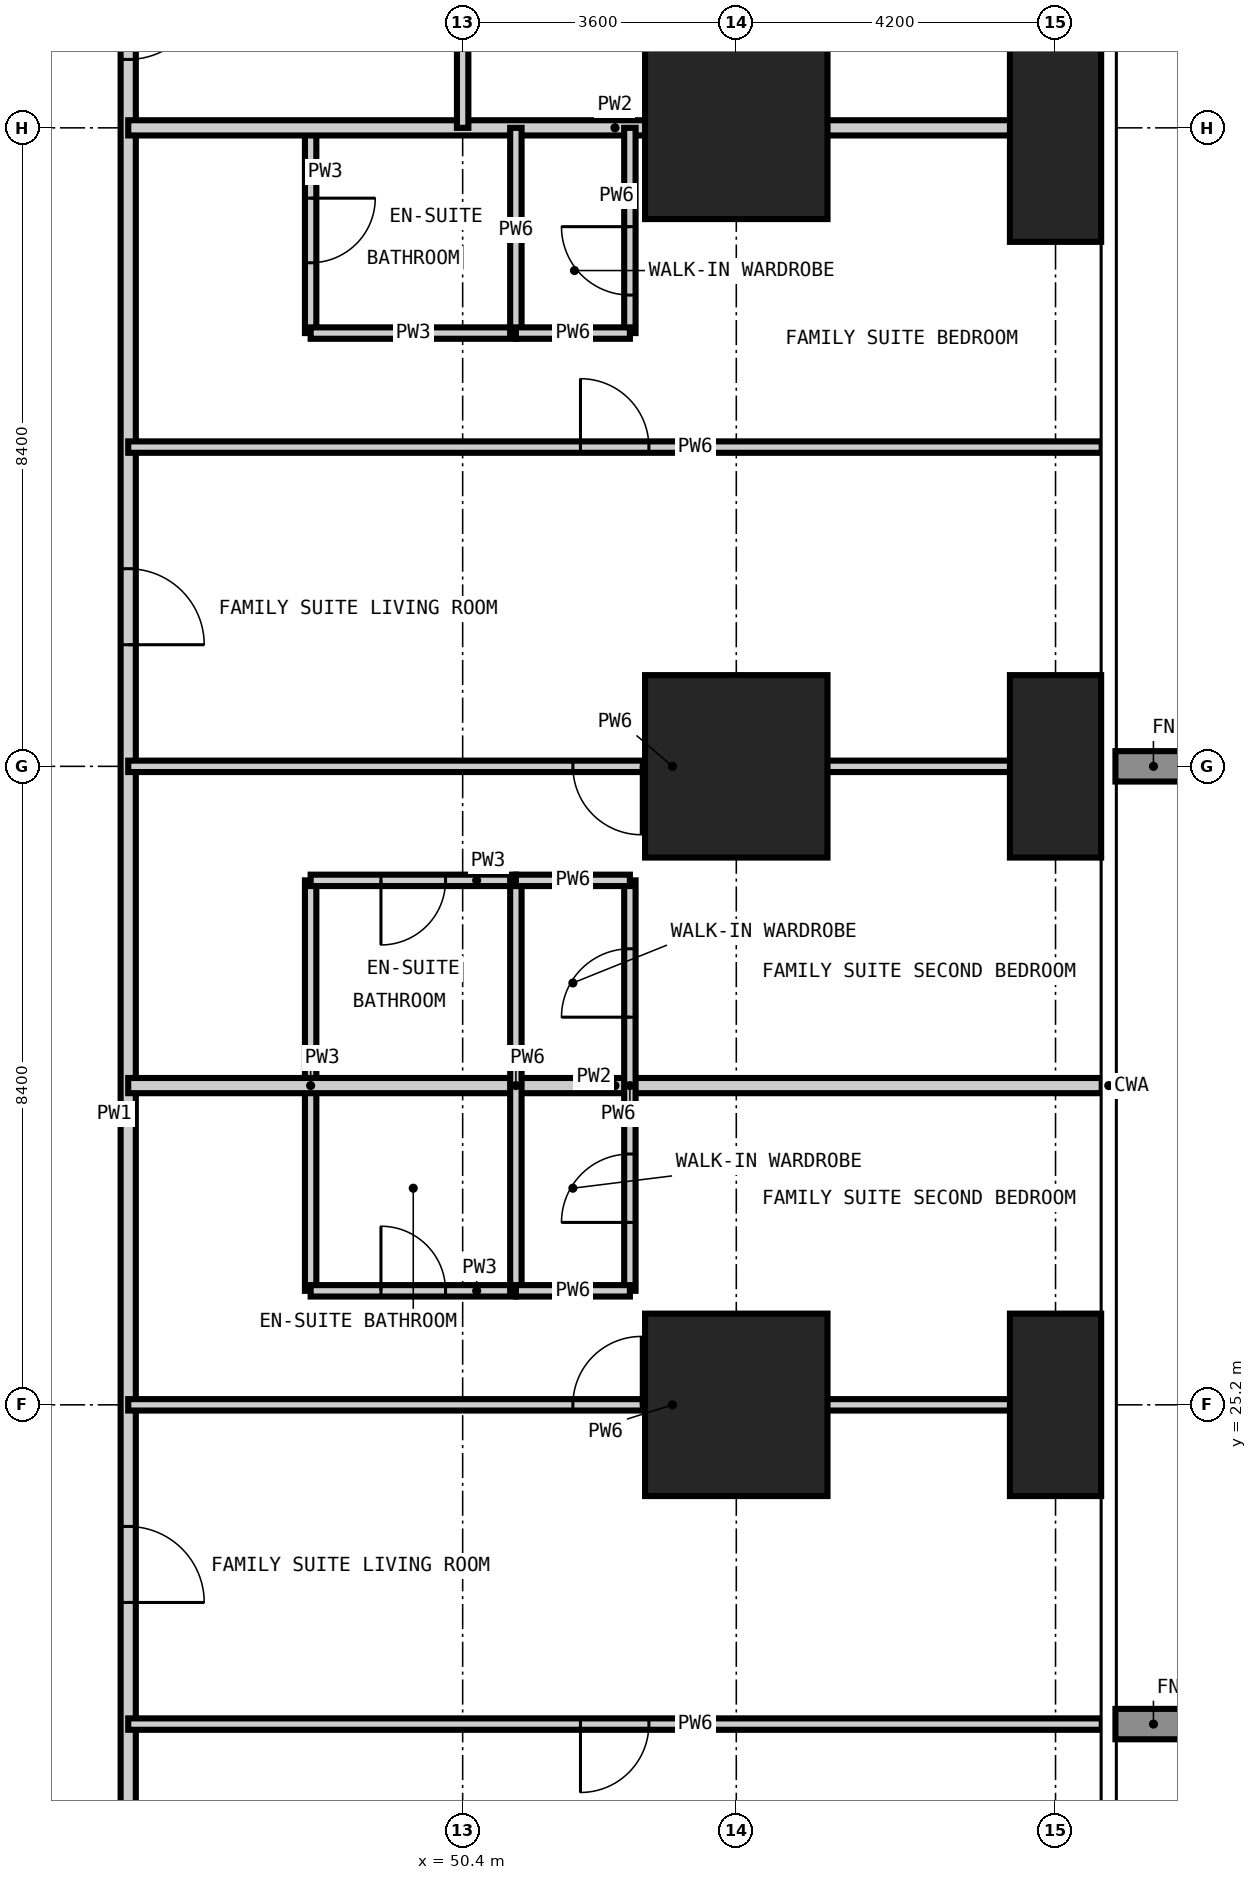
"""IFC4 building model, lengths in metres.
Left out: names, types, materials, properties, quantities, classifications, styles, units other than length and angle.
Written with IfcOpenShell. Run it as: python <this file> out.ifc"""

import sys

from ifc_helpers import new_model, si_unit, direction, frame, frame_2d, origin, origin_2d, place, context, subcontext, project, spatial, rectangle, extrude, element, fill, save


model = new_model("IFC4")
c1 = context("Model", 3, precision=1e-05, world=origin(), true_north=direction((0.0, 1.0)))
c2 = subcontext(c1, "Body", "Model", "MODEL_VIEW")
j1 = project(units=[si_unit("LENGTHUNIT", "METRE"), si_unit("PLANEANGLEUNIT", "RADIAN")], contexts=[c1])
p1 = place(None, origin())
s1 = spatial("IfcSite", under=j1, at=p1, CompositionType="ELEMENT")
p2 = place(p1, origin())
s2 = spatial("IfcBuilding", under=s1, at=p2, CompositionType="ELEMENT")
p3 = place(p2, frame((0.0, 0.0, 84.6)))
s3 = spatial("IfcBuildingStorey", under=s2, at=p3, CompositionType="ELEMENT", Elevation=84.6)
for number, where, z_axis, x_axis in (
    (1, (54.0, 25.2, -0.35), (0.0, 0.0, 1.0), (1.0, 0.0, 0.0)),
    (2, (54.0, 33.6, -0.35), (0.0, 0.0, 1.0), (1.0, 0.0, 0.0)),
    (3, (54.0, 42.0, -0.35), (0.0, 0.0, 1.0), (1.0, 0.0, 0.0)),
):
    element("IfcColumn", number, at=place(p3, frame(where, z_axis=z_axis, x_axis=x_axis)), inside=s3, PredefinedType="COLUMN", context=c2, shape_type="SweptSolid", body=[
        extrude(rectangle(XDim=2.4, YDim=2.4, at=origin_2d()), origin(), (0.0, 0.0, 1.0), 3.55),
    ])
for number, where, z_axis, x_axis in (
    (4, (58.2, 25.2, -0.35), (0.0, 0.0, 1.0), (1.0, 0.0, 0.0)),
    (5, (58.2, 33.6, -0.35), (0.0, 0.0, 1.0), (1.0, 0.0, 0.0)),
):
    element("IfcColumn", number, at=place(p3, frame(where, z_axis=z_axis, x_axis=x_axis)), inside=s3, PredefinedType="COLUMN", context=c2, shape_type="SweptSolid", body=[
        extrude(rectangle(XDim=1.2, YDim=2.4, at=origin_2d()), origin(), (0.0, 0.0, 1.0), 3.55),
    ])
p4 = place(p3, frame((58.2, 42.0, -0.35), z_axis=(0.0, 0.0, 1.0), x_axis=(1.0, 0.0, 0.0)))
e6 = element("IfcColumn", 6, at=p4, inside=s3, PredefinedType="COLUMN", context=c2, shape_type="SweptSolid", body=[
    extrude(rectangle(XDim=1.2, YDim=3.0, at=origin_2d()), origin(), (0.0, 0.0, 1.0), 3.55),
])
p5 = place(p3, frame((48.4, 26.7, 0.0), z_axis=(0.0, 0.0, 1.0), x_axis=(0.0, 1.0, 0.0)))
e7 = element("IfcWall", 7, at=p5, inside=s3, PredefinedType="PARTITIONING", context=c2, shape_type="SweptSolid", body=[
    extrude(rectangle(XDim=5.4, YDim=0.15, at=frame_2d((2.7, 0.0))), origin(), (0.0, 0.0, 1.0), 3.2),
])
p6 = place(p3, frame((48.4, 39.3, 0.0), z_axis=(0.0, 0.0, 1.0), x_axis=(0.0, 1.0, 0.0)))
e8 = element("IfcWall", 8, at=p6, inside=s3, PredefinedType="PARTITIONING", context=c2, shape_type="SweptSolid", body=[
    extrude(rectangle(XDim=2.7, YDim=0.15, at=frame_2d((1.35, 0.0))), origin(), (0.0, 0.0, 1.0), 3.2),
])
p7 = place(p6, frame((0.925, 0.0, 0.0)))
e9 = element("IfcOpeningElement", 9, at=p7, cuts=e8, PredefinedType="OPENING", context=c2, shape_type="SweptSolid", body=[
    extrude(rectangle(XDim=0.85, YDim=2.1, at=frame_2d((0.425, 1.05))), frame((0.0, 0.085, 0.0), z_axis=(0.0, -1.0, 0.0), x_axis=(1.0, 0.0, 0.0)), (0.0, 0.0, 1.0), 0.17),
])
p8 = place(p3, frame((48.4, 26.7, 0.0), z_axis=(0.0, 0.0, 1.0), x_axis=(1.0, 0.0, 0.0)))
e10 = element("IfcWall", 10, at=p8, inside=s3, PredefinedType="PARTITIONING", context=c2, shape_type="SweptSolid", body=[
    extrude(rectangle(XDim=2.7, YDim=0.15, at=frame_2d((1.35, 0.0))), origin(), (0.0, 0.0, 1.0), 3.2),
])
p9 = place(p8, frame((0.925, 0.0, 0.0)))
e11 = element("IfcOpeningElement", 11, at=p9, cuts=e10, PredefinedType="OPENING", context=c2, shape_type="SweptSolid", body=[
    extrude(rectangle(XDim=0.85, YDim=2.1, at=frame_2d((0.425, 1.05))), frame((0.0, 0.085, 0.0), z_axis=(0.0, -1.0, 0.0), x_axis=(1.0, 0.0, 0.0)), (0.0, 0.0, 1.0), 0.17),
])
p10 = place(p3, frame((48.4, 32.1, 0.0), z_axis=(0.0, 0.0, 1.0), x_axis=(1.0, 0.0, 0.0)))
e12 = element("IfcWall", 12, at=p10, inside=s3, PredefinedType="PARTITIONING", context=c2, shape_type="SweptSolid", body=[
    extrude(rectangle(XDim=2.7, YDim=0.15, at=frame_2d((1.35, 0.0))), origin(), (0.0, 0.0, 1.0), 3.2),
])
p11 = place(p10, frame((0.925, 0.0, 0.0)))
e13 = element("IfcOpeningElement", 13, at=p11, cuts=e12, PredefinedType="OPENING", context=c2, shape_type="SweptSolid", body=[
    extrude(rectangle(XDim=0.85, YDim=2.1, at=frame_2d((0.425, 1.05))), frame((0.0, 0.085, 0.0), z_axis=(0.0, -1.0, 0.0), x_axis=(1.0, 0.0, 0.0)), (0.0, 0.0, 1.0), 0.17),
])
p12 = place(p3, frame((48.4, 39.3, 0.0), z_axis=(0.0, 0.0, 1.0), x_axis=(1.0, 0.0, 0.0)))
e14 = element("IfcWall", 14, at=p12, inside=s3, PredefinedType="PARTITIONING", context=c2, shape_type="SweptSolid", body=[
    extrude(rectangle(XDim=2.7, YDim=0.15, at=frame_2d((1.35, 0.0))), origin(), (0.0, 0.0, 1.0), 3.2),
])
p13 = place(p3, frame((46.0, 44.8, 0.0), z_axis=(0.0, 0.0, 1.0), x_axis=(0.0, -1.0, 0.0)))
e15 = element("IfcWall", 15, at=p13, inside=s3, PredefinedType="PARTITIONING", context=c2, shape_type="SweptSolid", body=[
    extrude(rectangle(XDim=31.4, YDim=0.2, at=frame_2d((15.7, 0.0))), origin(), (0.0, 0.0, 1.0), 3.2),
])
p14 = place(p13, frame((21.2, 0.0, 0.0)))
e16 = element("IfcOpeningElement", 16, at=p14, cuts=e15, PredefinedType="OPENING", context=c2, shape_type="SweptSolid", body=[
    extrude(rectangle(XDim=1.0, YDim=2.2, at=frame_2d((0.5, 1.1))), frame((0.0, 0.11, 0.0), z_axis=(0.0, -1.0, 0.0), x_axis=(1.0, 0.0, 0.0)), (0.0, 0.0, 1.0), 0.22),
])
p15 = place(p13, frame((8.6, 0.0, 0.0)))
e17 = element("IfcOpeningElement", 17, at=p15, cuts=e15, PredefinedType="OPENING", context=c2, shape_type="SweptSolid", body=[
    extrude(rectangle(XDim=1.0, YDim=2.2, at=frame_2d((0.5, 1.1))), frame((0.0, 0.11, 0.0), z_axis=(0.0, -1.0, 0.0), x_axis=(1.0, 0.0, 0.0)), (0.0, 0.0, 1.0), 0.22),
])
p16 = place(p13, frame((29.2, 0.0, 0.0)))
e18 = element("IfcOpeningElement", 18, at=p16, cuts=e15, PredefinedType="OPENING", context=c2, shape_type="SweptSolid", body=[
    extrude(rectangle(XDim=1.0, YDim=2.2, at=frame_2d((0.5, 1.1))), frame((0.0, 0.11, 0.0), z_axis=(0.0, -1.0, 0.0), x_axis=(1.0, 0.0, 0.0)), (0.0, 0.0, 1.0), 0.22),
])
p17 = place(p13, frame((0.9, 0.0, 0.0)))
e19 = element("IfcOpeningElement", 19, at=p17, cuts=e15, PredefinedType="OPENING", context=c2, shape_type="SweptSolid", body=[
    extrude(rectangle(XDim=1.0, YDim=2.2, at=frame_2d((0.5, 1.1))), frame((0.0, 0.11, 0.0), z_axis=(0.0, -1.0, 0.0), x_axis=(1.0, 0.0, 0.0)), (0.0, 0.0, 1.0), 0.22),
])
for number, where, z_axis, x_axis in (
    (20, (46.0, 29.4, 0.0), (0.0, 0.0, 1.0), (1.0, 0.0, 0.0)),
    (21, (46.0, 42.0, 0.0), (0.0, 0.0, 1.0), (1.0, 0.0, 0.0)),
):
    element("IfcWall", number, at=place(p3, frame(where, z_axis=z_axis, x_axis=x_axis)), inside=s3, PredefinedType="PARTITIONING", context=c2, shape_type="SweptSolid", body=[
        extrude(rectangle(XDim=12.808, YDim=0.2, at=frame_2d((6.404, 0.0))), origin(), (0.0, 0.0, 1.0), 3.2),
    ])
p18 = place(p3, frame((50.4, 42.0, 0.0), z_axis=(0.0, 0.0, 1.0), x_axis=(0.0, 1.0, 0.0)))
e22 = element("IfcWall", 22, at=p18, inside=s3, PredefinedType="PARTITIONING", context=c2, shape_type="SweptSolid", body=[
    extrude(rectangle(XDim=16.808, YDim=0.15, at=frame_2d((8.404, 0.0))), origin(), (0.0, 0.0, 1.0), 3.2),
])
p19 = place(p18, frame((13.95, 0.0, 0.0)))
e23 = element("IfcOpeningElement", 23, at=p19, cuts=e22, PredefinedType="OPENING", context=c2, shape_type="SweptSolid", body=[
    extrude(rectangle(XDim=0.9, YDim=2.1, at=frame_2d((0.45, 1.05))), frame((0.0, 0.085, 0.0), z_axis=(0.0, -1.0, 0.0), x_axis=(1.0, 0.0, 0.0)), (0.0, 0.0, 1.0), 0.17),
])
p20 = place(p18, frame((3.75, 0.0, 0.0)))
e24 = element("IfcOpeningElement", 24, at=p20, cuts=e22, PredefinedType="OPENING", context=c2, shape_type="SweptSolid", body=[
    extrude(rectangle(XDim=0.9, YDim=2.1, at=frame_2d((0.45, 1.05))), frame((0.0, 0.085, 0.0), z_axis=(0.0, -1.0, 0.0), x_axis=(1.0, 0.0, 0.0)), (0.0, 0.0, 1.0), 0.17),
])
p21 = place(p3, frame((51.1, 26.7, 0.0), z_axis=(0.0, 0.0, 1.0), x_axis=(0.0, 1.0, 0.0)))
e25 = element("IfcWall", 25, at=p21, inside=s3, PredefinedType="PARTITIONING", context=c2, shape_type="SweptSolid", body=[
    extrude(rectangle(XDim=5.4, YDim=0.15, at=frame_2d((2.7, 0.0))), origin(), (0.0, 0.0, 1.0), 3.2),
])
p22 = place(p3, frame((51.1, 39.3, 0.0), z_axis=(0.0, 0.0, 1.0), x_axis=(0.0, 1.0, 0.0)))
e26 = element("IfcWall", 26, at=p22, inside=s3, PredefinedType="PARTITIONING", context=c2, shape_type="SweptSolid", body=[
    extrude(rectangle(XDim=2.7, YDim=0.15, at=frame_2d((1.35, 0.0))), origin(), (0.0, 0.0, 1.0), 3.2),
])
p23 = place(p3, frame((52.6, 26.7, 0.0), z_axis=(0.0, 0.0, 1.0), x_axis=(0.0, 1.0, 0.0)))
e27 = element("IfcWall", 27, at=p23, inside=s3, PredefinedType="PARTITIONING", context=c2, shape_type="SweptSolid", body=[
    extrude(rectangle(XDim=5.4, YDim=0.15, at=frame_2d((2.7, 0.0))), origin(), (0.0, 0.0, 1.0), 3.2),
])
p24 = place(p23, frame((0.9, 0.0, 0.0)))
e28 = element("IfcOpeningElement", 28, at=p24, cuts=e27, PredefinedType="OPENING", context=c2, shape_type="SweptSolid", body=[
    extrude(rectangle(XDim=0.9, YDim=2.1, at=frame_2d((0.45, 1.05))), frame((0.0, 0.085, 0.0), z_axis=(0.0, -1.0, 0.0), x_axis=(1.0, 0.0, 0.0)), (0.0, 0.0, 1.0), 0.17),
])
p25 = place(p23, frame((3.6, 0.0, 0.0)))
e29 = element("IfcOpeningElement", 29, at=p25, cuts=e27, PredefinedType="OPENING", context=c2, shape_type="SweptSolid", body=[
    extrude(rectangle(XDim=0.9, YDim=2.1, at=frame_2d((0.45, 1.05))), frame((0.0, 0.085, 0.0), z_axis=(0.0, -1.0, 0.0), x_axis=(1.0, 0.0, 0.0)), (0.0, 0.0, 1.0), 0.17),
])
p26 = place(p3, frame((52.6, 39.3, 0.0), z_axis=(0.0, 0.0, 1.0), x_axis=(0.0, 1.0, 0.0)))
e30 = element("IfcWall", 30, at=p26, inside=s3, PredefinedType="PARTITIONING", context=c2, shape_type="SweptSolid", body=[
    extrude(rectangle(XDim=2.7, YDim=0.15, at=frame_2d((1.35, 0.0))), origin(), (0.0, 0.0, 1.0), 3.2),
])
p27 = place(p26, frame((0.5, 0.0, 0.0)))
e31 = element("IfcOpeningElement", 31, at=p27, cuts=e30, PredefinedType="OPENING", context=c2, shape_type="SweptSolid", body=[
    extrude(rectangle(XDim=0.9, YDim=2.1, at=frame_2d((0.45, 1.05))), frame((0.0, 0.085, 0.0), z_axis=(0.0, -1.0, 0.0), x_axis=(1.0, 0.0, 0.0)), (0.0, 0.0, 1.0), 0.17),
])
p28 = place(p3, frame((46.0, 21.0, 0.0), z_axis=(0.0, 0.0, 1.0), x_axis=(1.0, 0.0, 0.0)))
e32 = element("IfcWall", 32, at=p28, inside=s3, PredefinedType="PARTITIONING", context=c2, shape_type="SweptSolid", body=[
    extrude(rectangle(XDim=12.808, YDim=0.15, at=frame_2d((6.404, 0.0))), origin(), (0.0, 0.0, 1.0), 3.2),
])
p29 = place(p28, frame((5.95, 0.0, 0.0)))
e33 = element("IfcOpeningElement", 33, at=p29, cuts=e32, PredefinedType="OPENING", context=c2, shape_type="SweptSolid", body=[
    extrude(rectangle(XDim=0.9, YDim=2.1, at=frame_2d((0.45, 1.05))), frame((0.0, 0.085, 0.0), z_axis=(0.0, -1.0, 0.0), x_axis=(1.0, 0.0, 0.0)), (0.0, 0.0, 1.0), 0.17),
])
p30 = place(p3, frame((46.0, 25.2, 0.0), z_axis=(0.0, 0.0, 1.0), x_axis=(1.0, 0.0, 0.0)))
e34 = element("IfcWall", 34, at=p30, inside=s3, PredefinedType="PARTITIONING", context=c2, shape_type="SweptSolid", body=[
    extrude(rectangle(XDim=12.808, YDim=0.15, at=frame_2d((6.404, 0.0))), origin(), (0.0, 0.0, 1.0), 3.2),
])
p31 = place(p30, frame((5.85, 0.0, 0.0)))
e35 = element("IfcOpeningElement", 35, at=p31, cuts=e34, PredefinedType="OPENING", context=c2, shape_type="SweptSolid", body=[
    extrude(rectangle(XDim=0.9, YDim=2.1, at=frame_2d((0.45, 1.05))), frame((0.0, 0.085, 0.0), z_axis=(0.0, -1.0, 0.0), x_axis=(1.0, 0.0, 0.0)), (0.0, 0.0, 1.0), 0.17),
])
for number, where, z_axis, x_axis in (
    (36, (51.1, 26.7, 0.0), (0.0, 0.0, 1.0), (1.0, 0.0, 0.0)),
    (37, (51.1, 32.1, 0.0), (0.0, 0.0, 1.0), (1.0, 0.0, 0.0)),
):
    element("IfcWall", number, at=place(p3, frame(where, z_axis=z_axis, x_axis=x_axis)), inside=s3, PredefinedType="PARTITIONING", context=c2, shape_type="SweptSolid", body=[
        extrude(rectangle(XDim=1.5, YDim=0.15, at=frame_2d((0.75, 0.0))), origin(), (0.0, 0.0, 1.0), 3.2),
    ])
p32 = place(p3, frame((46.0, 33.6, 0.0), z_axis=(0.0, 0.0, 1.0), x_axis=(1.0, 0.0, 0.0)))
e38 = element("IfcWall", 38, at=p32, inside=s3, PredefinedType="PARTITIONING", context=c2, shape_type="SweptSolid", body=[
    extrude(rectangle(XDim=12.808, YDim=0.15, at=frame_2d((6.404, 0.0))), origin(), (0.0, 0.0, 1.0), 3.2),
])
p33 = place(p32, frame((5.85, 0.0, 0.0)))
e39 = element("IfcOpeningElement", 39, at=p33, cuts=e38, PredefinedType="OPENING", context=c2, shape_type="SweptSolid", body=[
    extrude(rectangle(XDim=0.9, YDim=2.1, at=frame_2d((0.45, 1.05))), frame((0.0, 0.085, 0.0), z_axis=(0.0, -1.0, 0.0), x_axis=(1.0, 0.0, 0.0)), (0.0, 0.0, 1.0), 0.17),
])
p34 = place(p3, frame((46.0, 37.8, 0.0), z_axis=(0.0, 0.0, 1.0), x_axis=(1.0, 0.0, 0.0)))
e40 = element("IfcWall", 40, at=p34, inside=s3, PredefinedType="PARTITIONING", context=c2, shape_type="SweptSolid", body=[
    extrude(rectangle(XDim=12.808, YDim=0.15, at=frame_2d((6.404, 0.0))), origin(), (0.0, 0.0, 1.0), 3.2),
])
p35 = place(p34, frame((5.95, 0.0, 0.0)))
e41 = element("IfcOpeningElement", 41, at=p35, cuts=e40, PredefinedType="OPENING", context=c2, shape_type="SweptSolid", body=[
    extrude(rectangle(XDim=0.9, YDim=2.1, at=frame_2d((0.45, 1.05))), frame((0.0, 0.085, 0.0), z_axis=(0.0, -1.0, 0.0), x_axis=(1.0, 0.0, 0.0)), (0.0, 0.0, 1.0), 0.17),
])
p36 = place(p3, frame((51.1, 39.3, 0.0), z_axis=(0.0, 0.0, 1.0), x_axis=(1.0, 0.0, 0.0)))
e42 = element("IfcWall", 42, at=p36, inside=s3, PredefinedType="PARTITIONING", context=c2, shape_type="SweptSolid", body=[
    extrude(rectangle(XDim=1.5, YDim=0.15, at=frame_2d((0.75, 0.0))), origin(), (0.0, 0.0, 1.0), 3.2),
])
p37 = place(p14, origin())
e43 = element("IfcDoor", 43, at=p37, inside=s3, OperationType="SINGLE_SWING_RIGHT", PredefinedType="DOOR", context=c2, shape_type="SweptSolid", body=[
    extrude(rectangle(XDim=1.0, YDim=2.2, at=frame_2d((0.5, 1.1))), frame((0.0, 0.025, 0.0), z_axis=(0.0, -1.0, 0.0), x_axis=(1.0, 0.0, 0.0)), (0.0, 0.0, 1.0), 0.05),
])
fill(e16, e43)
p38 = place(p29, frame((0.9, 0.0, 0.0), z_axis=(0.0, 0.0, 1.0), x_axis=(-1.0, 0.0, 0.0)))
e44 = element("IfcDoor", 44, at=p38, inside=s3, OperationType="SINGLE_SWING_RIGHT", PredefinedType="DOOR", context=c2, shape_type="SweptSolid", body=[
    extrude(rectangle(XDim=0.9, YDim=2.1, at=frame_2d((0.45, 1.05))), frame((0.0, 0.025, 0.0), z_axis=(0.0, -1.0, 0.0), x_axis=(1.0, 0.0, 0.0)), (0.0, 0.0, 1.0), 0.05),
])
fill(e33, e44)
p39 = place(p31, origin())
e45 = element("IfcDoor", 45, at=p39, inside=s3, OperationType="SINGLE_SWING_RIGHT", PredefinedType="DOOR", context=c2, shape_type="SweptSolid", body=[
    extrude(rectangle(XDim=0.9, YDim=2.1, at=frame_2d((0.45, 1.05))), frame((0.0, 0.025, 0.0), z_axis=(0.0, -1.0, 0.0), x_axis=(1.0, 0.0, 0.0)), (0.0, 0.0, 1.0), 0.05),
])
fill(e35, e45)
p40 = place(p9, origin())
e46 = element("IfcDoor", 46, at=p40, inside=s3, OperationType="SINGLE_SWING_LEFT", PredefinedType="DOOR", context=c2, shape_type="SweptSolid", body=[
    extrude(rectangle(XDim=0.85, YDim=2.1, at=frame_2d((0.425, 1.05))), frame((0.0, 0.025, 0.0), z_axis=(0.0, -1.0, 0.0), x_axis=(1.0, 0.0, 0.0)), (0.0, 0.0, 1.0), 0.05),
])
fill(e11, e46)
p41 = place(p24, origin())
e47 = element("IfcDoor", 47, at=p41, inside=s3, OperationType="SINGLE_SWING_LEFT", PredefinedType="DOOR", context=c2, shape_type="SweptSolid", body=[
    extrude(rectangle(XDim=0.9, YDim=2.1, at=frame_2d((0.45, 1.05))), frame((0.0, 0.025, 0.0), z_axis=(0.0, -1.0, 0.0), x_axis=(1.0, 0.0, 0.0)), (0.0, 0.0, 1.0), 0.05),
])
fill(e28, e47)
p42 = place(p15, origin())
e48 = element("IfcDoor", 48, at=p42, inside=s3, OperationType="SINGLE_SWING_RIGHT", PredefinedType="DOOR", context=c2, shape_type="SweptSolid", body=[
    extrude(rectangle(XDim=1.0, YDim=2.2, at=frame_2d((0.5, 1.1))), frame((0.0, 0.025, 0.0), z_axis=(0.0, -1.0, 0.0), x_axis=(1.0, 0.0, 0.0)), (0.0, 0.0, 1.0), 0.05),
])
fill(e17, e48)
p43 = place(p35, origin())
e49 = element("IfcDoor", 49, at=p43, inside=s3, OperationType="SINGLE_SWING_LEFT", PredefinedType="DOOR", context=c2, shape_type="SweptSolid", body=[
    extrude(rectangle(XDim=0.9, YDim=2.1, at=frame_2d((0.45, 1.05))), frame((0.0, 0.025, 0.0), z_axis=(0.0, -1.0, 0.0), x_axis=(1.0, 0.0, 0.0)), (0.0, 0.0, 1.0), 0.05),
])
fill(e41, e49)
p44 = place(p7, frame((0.85, 0.0, 0.0), z_axis=(0.0, 0.0, 1.0), x_axis=(-1.0, 0.0, 0.0)))
e50 = element("IfcDoor", 50, at=p44, inside=s3, OperationType="SINGLE_SWING_LEFT", PredefinedType="DOOR", context=c2, shape_type="SweptSolid", body=[
    extrude(rectangle(XDim=0.85, YDim=2.1, at=frame_2d((0.425, 1.05))), frame((0.0, 0.025, 0.0), z_axis=(0.0, -1.0, 0.0), x_axis=(1.0, 0.0, 0.0)), (0.0, 0.0, 1.0), 0.05),
])
fill(e9, e50)
p45 = place(p27, origin())
e51 = element("IfcDoor", 51, at=p45, inside=s3, OperationType="SINGLE_SWING_RIGHT", PredefinedType="DOOR", context=c2, shape_type="SweptSolid", body=[
    extrude(rectangle(XDim=0.9, YDim=2.1, at=frame_2d((0.45, 1.05))), frame((0.0, 0.025, 0.0), z_axis=(0.0, -1.0, 0.0), x_axis=(1.0, 0.0, 0.0)), (0.0, 0.0, 1.0), 0.05),
])
fill(e31, e51)
p46 = place(p33, frame((0.9, 0.0, 0.0), z_axis=(0.0, 0.0, 1.0), x_axis=(-1.0, 0.0, 0.0)))
e52 = element("IfcDoor", 52, at=p46, inside=s3, OperationType="SINGLE_SWING_LEFT", PredefinedType="DOOR", context=c2, shape_type="SweptSolid", body=[
    extrude(rectangle(XDim=0.9, YDim=2.1, at=frame_2d((0.45, 1.05))), frame((0.0, 0.025, 0.0), z_axis=(0.0, -1.0, 0.0), x_axis=(1.0, 0.0, 0.0)), (0.0, 0.0, 1.0), 0.05),
])
fill(e39, e52)
p47 = place(p11, frame((0.85, 0.0, 0.0), z_axis=(0.0, 0.0, 1.0), x_axis=(-1.0, 0.0, 0.0)))
e53 = element("IfcDoor", 53, at=p47, inside=s3, OperationType="SINGLE_SWING_RIGHT", PredefinedType="DOOR", context=c2, shape_type="SweptSolid", body=[
    extrude(rectangle(XDim=0.85, YDim=2.1, at=frame_2d((0.425, 1.05))), frame((0.0, 0.025, 0.0), z_axis=(0.0, -1.0, 0.0), x_axis=(1.0, 0.0, 0.0)), (0.0, 0.0, 1.0), 0.05),
])
fill(e13, e53)
p48 = place(p25, origin())
e54 = element("IfcDoor", 54, at=p48, inside=s3, OperationType="SINGLE_SWING_LEFT", PredefinedType="DOOR", context=c2, shape_type="SweptSolid", body=[
    extrude(rectangle(XDim=0.9, YDim=2.1, at=frame_2d((0.45, 1.05))), frame((0.0, 0.025, 0.0), z_axis=(0.0, -1.0, 0.0), x_axis=(1.0, 0.0, 0.0)), (0.0, 0.0, 1.0), 0.05),
])
fill(e29, e54)
p49 = place(p17, origin())
e55 = element("IfcDoor", 55, at=p49, inside=s3, OperationType="SINGLE_SWING_LEFT", PredefinedType="DOOR", context=c2, shape_type="SweptSolid", body=[
    extrude(rectangle(XDim=1.0, YDim=2.2, at=frame_2d((0.5, 1.1))), frame((0.0, 0.025, 0.0), z_axis=(0.0, -1.0, 0.0), x_axis=(1.0, 0.0, 0.0)), (0.0, 0.0, 1.0), 0.05),
])
fill(e19, e55)
save(model, sys.argv[1])
